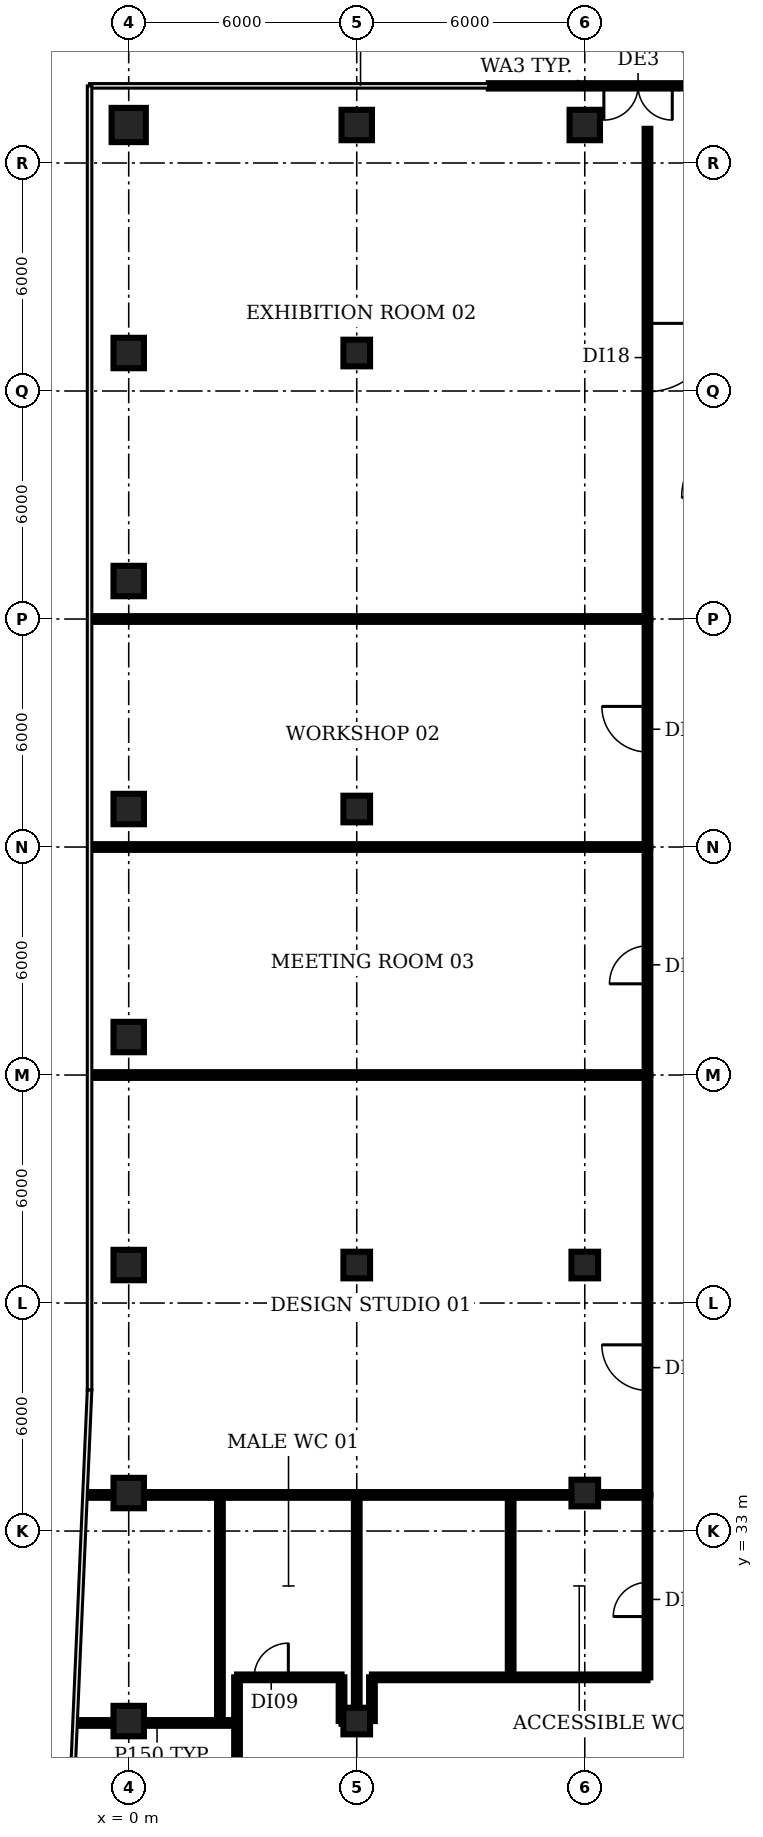
"""IFC4 building model, lengths in metres.
Left out: names, types, materials, properties, quantities, classifications, styles, units other than length and angle.
Written with IfcOpenShell. Run it as: python <this file> out.ifc"""

import sys

from ifc_helpers import new_model, si_unit, direction, frame, frame_2d, origin, origin_2d, place, context, subcontext, project, spatial, rectangle, circle, extrude, element, fill, save


model = new_model("IFC4")
c1 = context("Model", 3, precision=1e-05, world=origin(), true_north=direction((0.0, 1.0)))
c2 = subcontext(c1, "Body", "Model", "MODEL_VIEW")
j1 = project(units=[si_unit("LENGTHUNIT", "METRE"), si_unit("PLANEANGLEUNIT", "RADIAN")], contexts=[c1])
p1 = place(None, origin())
s1 = spatial("IfcSite", under=j1, at=p1, CompositionType="ELEMENT")
p2 = place(p1, origin())
s2 = spatial("IfcBuilding", under=s1, at=p2, CompositionType="ELEMENT")
p3 = place(p2, frame((0.0, 0.0, 239.0)))
s3 = spatial("IfcBuildingStorey", under=s2, at=p3, CompositionType="ELEMENT", Elevation=239.0)
for number, where, z_axis, x_axis in (
    (1, (0.0, 28.0, 0.0), (0.0, 0.0, 1.0), (1.0, 0.0, 0.0)),
    (2, (0.0, 34.0, 0.0), (0.0, 0.0, 1.0), (1.0, 0.0, 0.0)),
    (3, (0.0, 40.0, 0.0), (0.0, 0.0, 1.0), (1.0, 0.0, 0.0)),
    (4, (0.0, 46.0, 0.0), (0.0, 0.0, 1.0), (1.0, 0.0, 0.0)),
    (5, (0.0, 52.0, 0.0), (0.0, 0.0, 1.0), (1.0, 0.0, 0.0)),
    (6, (0.0, 58.0, 0.0), (0.0, 0.0, 1.0), (1.0, 0.0, 0.0)),
    (7, (0.0, 64.0, 0.0), (0.0, 0.0, 1.0), (1.0, 0.0, 0.0)),
):
    element("IfcColumn", number, at=place(p3, frame(where, z_axis=z_axis, x_axis=x_axis)), inside=s3, PredefinedType="COLUMN", context=c2, shape_type="SweptSolid", body=[
        extrude(rectangle(XDim=0.8, YDim=0.8, at=origin_2d()), origin(), (0.0, 0.0, 1.0), 3.85),
    ])
p4 = place(p3, frame((0.0, 70.0, 0.0), z_axis=(0.0, 0.0, 1.0), x_axis=(1.0, 0.0, 0.0)))
e8 = element("IfcColumn", 8, at=p4, inside=s3, PredefinedType="COLUMN", context=c2, shape_type="SweptSolid", body=[
    extrude(circle(Radius=0.45, at=origin_2d()), origin(), (0.0, 0.0, 1.0), 3.85),
])
for number, where, z_axis, x_axis in (
    (9, (6.0, 28.0, 0.0), (0.0, 0.0, 1.0), (1.0, 0.0, 0.0)),
    (10, (6.0, 40.0, 0.0), (0.0, 0.0, 1.0), (1.0, 0.0, 0.0)),
    (11, (6.0, 52.0, 0.0), (0.0, 0.0, 1.0), (1.0, 0.0, 0.0)),
    (12, (6.0, 64.0, 0.0), (0.0, 0.0, 1.0), (1.0, 0.0, 0.0)),
):
    element("IfcColumn", number, at=place(p3, frame(where, z_axis=z_axis, x_axis=x_axis)), inside=s3, PredefinedType="COLUMN", context=c2, shape_type="SweptSolid", body=[
        extrude(rectangle(XDim=0.7, YDim=0.7, at=origin_2d()), origin(), (0.0, 0.0, 1.0), 3.85),
    ])
p5 = place(p3, frame((6.0, 70.0, 0.0), z_axis=(0.0, 0.0, 1.0), x_axis=(1.0, 0.0, 0.0)))
e13 = element("IfcColumn", 13, at=p5, inside=s3, PredefinedType="COLUMN", context=c2, shape_type="SweptSolid", body=[
    extrude(rectangle(XDim=0.8, YDim=0.8, at=origin_2d()), origin(), (0.0, 0.0, 1.0), 3.85),
])
for number, where, z_axis, x_axis in (
    (14, (12.0, 34.0, 0.0), (0.0, 0.0, 1.0), (1.0, 0.0, 0.0)),
    (15, (12.0, 40.0, 0.0), (0.0, 0.0, 1.0), (1.0, 0.0, 0.0)),
):
    element("IfcColumn", number, at=place(p3, frame(where, z_axis=z_axis, x_axis=x_axis)), inside=s3, PredefinedType="COLUMN", context=c2, shape_type="SweptSolid", body=[
        extrude(rectangle(XDim=0.7, YDim=0.7, at=origin_2d()), origin(), (0.0, 0.0, 1.0), 3.85),
    ])
p6 = place(p3, frame((12.0, 70.0, 0.0), z_axis=(0.0, 0.0, 1.0), x_axis=(1.0, 0.0, 0.0)))
e16 = element("IfcColumn", 16, at=p6, inside=s3, PredefinedType="COLUMN", context=c2, shape_type="SweptSolid", body=[
    extrude(rectangle(XDim=0.8, YDim=0.8, at=origin_2d()), origin(), (0.0, 0.0, 1.0), 3.85),
])
p7 = place(p3, frame((14.729, 71.03, 0.0), z_axis=(0.0, 0.0, 1.0), x_axis=(-1.0, 0.0, 0.0)))
e17 = element("IfcWall", 17, at=p7, inside=s3, PredefinedType="SOLIDWALL", context=c2, shape_type="SweptSolid", body=[
    extrude(rectangle(XDim=5.253, YDim=0.14, at=frame_2d((2.626, 0.0))), origin(), (0.0, 0.0, 1.0), 3.85),
])
p8 = place(p7, frame((0.427, 0.0, 0.0)))
e18 = element("IfcOpeningElement", 18, at=p8, cuts=e17, PredefinedType="OPENING", context=c2, shape_type="SweptSolid", body=[
    extrude(rectangle(XDim=1.8, YDim=2.4, at=frame_2d((0.9, 1.2))), frame((0.0, 0.08, 0.0), z_axis=(0.0, -1.0, 0.0), x_axis=(1.0, 0.0, 0.0)), (0.0, 0.0, 1.0), 0.16),
])
p9 = place(p3, frame((-1.36, 27.95, 0.0), z_axis=(0.0, 0.0, 1.0), x_axis=(1.0, 0.0, 0.0)))
e19 = element("IfcWall", 19, at=p9, inside=s3, PredefinedType="PARTITIONING", context=c2, shape_type="SweptSolid", body=[
    extrude(rectangle(XDim=4.21, YDim=0.15, at=frame_2d((2.105, 0.0))), origin(), (0.0, 0.0, 1.0), 2.88),
])
p10 = place(p3, frame((-1.1, 33.95, 0.0), z_axis=(0.0, 0.0, 1.0), x_axis=(1.0, 0.0, 0.0)))
e20 = element("IfcWall", 20, at=p10, inside=s3, PredefinedType="PARTITIONING", context=c2, shape_type="SweptSolid", body=[
    extrude(rectangle(XDim=14.75, YDim=0.15, at=frame_2d((7.375, 0.0))), origin(), (0.0, 0.0, 1.0), 2.88),
])
for number, where, z_axis, x_axis in (
    (21, (-0.98, 45.0, 0.0), (0.0, 0.0, 1.0), (1.0, 0.0, 0.0)),
    (22, (-0.98, 51.0, 0.0), (0.0, 0.0, 1.0), (1.0, 0.0, 0.0)),
    (23, (-0.98, 57.0, 0.0), (0.0, 0.0, 1.0), (1.0, 0.0, 0.0)),
):
    element("IfcWall", number, at=place(p3, frame(where, z_axis=z_axis, x_axis=x_axis)), inside=s3, PredefinedType="PARTITIONING", context=c2, shape_type="SweptSolid", body=[
        extrude(rectangle(XDim=14.63, YDim=0.15, at=frame_2d((7.315, 0.0))), origin(), (0.0, 0.0, 1.0), 2.88),
    ])
p11 = place(p3, frame((2.4, 27.95, 0.0), z_axis=(0.0, 0.0, 1.0), x_axis=(0.0, 1.0, 0.0)))
e24 = element("IfcWall", 24, at=p11, inside=s3, PredefinedType="PARTITIONING", context=c2, shape_type="SweptSolid", body=[
    extrude(rectangle(XDim=6.0, YDim=0.15, at=frame_2d((3.0, 0.0))), origin(), (0.0, 0.0, 1.0), 2.88),
])
p12 = place(p3, frame((2.85, 25.25, 0.0), z_axis=(0.0, 0.0, 1.0), x_axis=(0.0, 1.0, 0.0)))
e25 = element("IfcWall", 25, at=p12, inside=s3, PredefinedType="PARTITIONING", context=c2, shape_type="SweptSolid", body=[
    extrude(rectangle(XDim=3.9, YDim=0.15, at=frame_2d((1.95, 0.0))), origin(), (0.0, 0.0, 1.0), 2.88),
])
p13 = place(p3, frame((2.85, 29.15, 0.0), z_axis=(0.0, 0.0, 1.0), x_axis=(1.0, 0.0, 0.0)))
e26 = element("IfcWall", 26, at=p13, inside=s3, PredefinedType="PARTITIONING", context=c2, shape_type="SweptSolid", body=[
    extrude(rectangle(XDim=2.75, YDim=0.15, at=frame_2d((1.375, 0.0))), origin(), (0.0, 0.0, 1.0), 2.88),
])
p14 = place(p13, frame((0.45, 0.0, 0.0)))
e27 = element("IfcOpeningElement", 27, at=p14, cuts=e26, PredefinedType="OPENING", context=c2, shape_type="SweptSolid", body=[
    extrude(rectangle(XDim=0.9, YDim=2.1, at=frame_2d((0.45, 1.05))), frame((0.0, 0.085, 0.0), z_axis=(0.0, -1.0, 0.0), x_axis=(1.0, 0.0, 0.0)), (0.0, 0.0, 1.0), 0.17),
])
p15 = place(p3, frame((5.6, 28.0, 0.0), z_axis=(0.0, 0.0, 1.0), x_axis=(0.0, 1.0, 0.0)))
e28 = element("IfcWall", 28, at=p15, inside=s3, PredefinedType="PARTITIONING", context=c2, shape_type="SweptSolid", body=[
    extrude(rectangle(XDim=1.15, YDim=0.15, at=frame_2d((0.575, 0.0))), origin(), (0.0, 0.0, 1.0), 2.88),
])
p16 = place(p3, frame((5.6, 28.0, 0.0), z_axis=(0.0, 0.0, 1.0), x_axis=(1.0, 0.0, 0.0)))
e29 = element("IfcWall", 29, at=p16, inside=s3, PredefinedType="PARTITIONING", context=c2, shape_type="SweptSolid", body=[
    extrude(rectangle(XDim=0.4, YDim=0.15, at=frame_2d((0.2, 0.0))), origin(), (0.0, 0.0, 1.0), 2.88),
])
p17 = place(p3, frame((6.0, 28.0, 0.0), z_axis=(0.0, 0.0, 1.0), x_axis=(0.0, 1.0, 0.0)))
e30 = element("IfcWall", 30, at=p17, inside=s3, PredefinedType="PARTITIONING", context=c2, shape_type="SweptSolid", body=[
    extrude(rectangle(XDim=5.95, YDim=0.15, at=frame_2d((2.975, 0.0))), origin(), (0.0, 0.0, 1.0), 2.88),
])
p18 = place(p3, frame((6.4, 28.0, 0.0), z_axis=(0.0, 0.0, 1.0), x_axis=(0.0, 1.0, 0.0)))
e31 = element("IfcWall", 31, at=p18, inside=s3, PredefinedType="PARTITIONING", context=c2, shape_type="SweptSolid", body=[
    extrude(rectangle(XDim=1.15, YDim=0.15, at=frame_2d((0.575, 0.0))), origin(), (0.0, 0.0, 1.0), 2.88),
])
p19 = place(p3, frame((6.4, 29.15, 0.0), z_axis=(0.0, 0.0, 1.0), x_axis=(1.0, 0.0, 0.0)))
e32 = element("IfcWall", 32, at=p19, inside=s3, PredefinedType="PARTITIONING", context=c2, shape_type="SweptSolid", body=[
    extrude(rectangle(XDim=7.25, YDim=0.15, at=frame_2d((3.625, 0.0))), origin(), (0.0, 0.0, 1.0), 2.88),
])
p20 = place(p3, frame((10.05, 29.15, 0.0), z_axis=(0.0, 0.0, 1.0), x_axis=(0.0, 1.0, 0.0)))
e33 = element("IfcWall", 33, at=p20, inside=s3, PredefinedType="PARTITIONING", context=c2, shape_type="SweptSolid", body=[
    extrude(rectangle(XDim=4.8, YDim=0.15, at=frame_2d((2.4, 0.0))), origin(), (0.0, 0.0, 1.0), 2.88),
])
p21 = place(p3, frame((13.65, 29.15, 0.0), z_axis=(0.0, 0.0, 1.0), x_axis=(0.0, 1.0, 0.0)))
e34 = element("IfcWall", 34, at=p21, inside=s3, PredefinedType="PARTITIONING", context=c2, shape_type="SweptSolid", body=[
    extrude(rectangle(XDim=4.8, YDim=0.15, at=frame_2d((2.4, 0.0))), origin(), (0.0, 0.0, 1.0), 2.88),
])
p22 = place(p21, frame((1.6, 0.0, 0.0)))
e35 = element("IfcOpeningElement", 35, at=p22, cuts=e34, PredefinedType="OPENING", context=c2, shape_type="SweptSolid", body=[
    extrude(rectangle(XDim=0.9, YDim=2.1, at=frame_2d((0.45, 1.05))), frame((0.0, 0.085, 0.0), z_axis=(0.0, -1.0, 0.0), x_axis=(1.0, 0.0, 0.0)), (0.0, 0.0, 1.0), 0.17),
])
p23 = place(p3, frame((13.65, 33.95, 0.0), z_axis=(0.0, 0.0, 1.0), x_axis=(0.0, 1.0, 0.0)))
e36 = element("IfcWall", 36, at=p23, inside=s3, PredefinedType="PARTITIONING", context=c2, shape_type="SweptSolid", body=[
    extrude(rectangle(XDim=11.05, YDim=0.15, at=frame_2d((5.525, 0.0))), origin(), (0.0, 0.0, 1.0), 2.88),
])
p24 = place(p23, frame((2.75, 0.0, 0.0)))
e37 = element("IfcOpeningElement", 37, at=p24, cuts=e36, PredefinedType="OPENING", context=c2, shape_type="SweptSolid", body=[
    extrude(rectangle(XDim=1.2, YDim=2.1, at=frame_2d((0.6, 1.05))), frame((0.0, 0.085, 0.0), z_axis=(0.0, -1.0, 0.0), x_axis=(1.0, 0.0, 0.0)), (0.0, 0.0, 1.0), 0.17),
])
p25 = place(p3, frame((13.65, 45.0, 0.0), z_axis=(0.0, 0.0, 1.0), x_axis=(0.0, 1.0, 0.0)))
e38 = element("IfcWall", 38, at=p25, inside=s3, PredefinedType="PARTITIONING", context=c2, shape_type="SweptSolid", body=[
    extrude(rectangle(XDim=6.0, YDim=0.15, at=frame_2d((3.0, 0.0))), origin(), (0.0, 0.0, 1.0), 2.88),
])
p26 = place(p25, frame((2.4, 0.0, 0.0)))
e39 = element("IfcOpeningElement", 39, at=p26, cuts=e38, PredefinedType="OPENING", context=c2, shape_type="SweptSolid", body=[
    extrude(rectangle(XDim=1.0, YDim=2.1, at=frame_2d((0.5, 1.05))), frame((0.0, 0.085, 0.0), z_axis=(0.0, -1.0, 0.0), x_axis=(1.0, 0.0, 0.0)), (0.0, 0.0, 1.0), 0.17),
])
p27 = place(p3, frame((13.65, 51.0, 0.0), z_axis=(0.0, 0.0, 1.0), x_axis=(0.0, 1.0, 0.0)))
e40 = element("IfcWall", 40, at=p27, inside=s3, PredefinedType="PARTITIONING", context=c2, shape_type="SweptSolid", body=[
    extrude(rectangle(XDim=6.0, YDim=0.15, at=frame_2d((3.0, 0.0))), origin(), (0.0, 0.0, 1.0), 2.88),
])
p28 = place(p27, frame((2.5, 0.0, 0.0)))
e41 = element("IfcOpeningElement", 41, at=p28, cuts=e40, PredefinedType="OPENING", context=c2, shape_type="SweptSolid", body=[
    extrude(rectangle(XDim=1.2, YDim=2.1, at=frame_2d((0.6, 1.05))), frame((0.0, 0.085, 0.0), z_axis=(0.0, -1.0, 0.0), x_axis=(1.0, 0.0, 0.0)), (0.0, 0.0, 1.0), 0.17),
])
p29 = place(p3, frame((13.65, 69.9, 0.0), z_axis=(0.0, 0.0, 1.0), x_axis=(0.0, -1.0, 0.0)))
e42 = element("IfcWall", 42, at=p29, inside=s3, PredefinedType="PARTITIONING", context=c2, shape_type="SweptSolid", body=[
    extrude(rectangle(XDim=12.9, YDim=0.15, at=frame_2d((6.45, 0.0))), origin(), (0.0, 0.0, 1.0), 2.88),
])
p30 = place(p29, frame((5.12, 0.0, 0.0)))
e43 = element("IfcOpeningElement", 43, at=p30, cuts=e42, PredefinedType="OPENING", context=c2, shape_type="SweptSolid", body=[
    extrude(rectangle(XDim=1.8, YDim=2.1, at=frame_2d((0.9, 1.05))), frame((0.0, 0.085, 0.0), z_axis=(0.0, -1.0, 0.0), x_axis=(1.0, 0.0, 0.0)), (0.0, 0.0, 1.0), 0.17),
])
p31 = place(p8, origin())
e44 = element("IfcDoor", 44, at=p31, inside=s3, OperationType="DOUBLE_DOOR_DOUBLE_SWING", PredefinedType="DOOR", context=c2, shape_type="SweptSolid", body=[
    extrude(rectangle(XDim=1.8, YDim=2.4, at=frame_2d((0.9, 1.2))), frame((0.0, 0.025, 0.0), z_axis=(0.0, -1.0, 0.0), x_axis=(1.0, 0.0, 0.0)), (0.0, 0.0, 1.0), 0.05),
])
fill(e18, e44)
p32 = place(p14, origin())
e45 = element("IfcDoor", 45, at=p32, inside=s3, OperationType="SINGLE_SWING_RIGHT", PredefinedType="DOOR", context=c2, shape_type="SweptSolid", body=[
    extrude(rectangle(XDim=0.9, YDim=2.1, at=frame_2d((0.45, 1.05))), frame((0.0, 0.025, 0.0), z_axis=(0.0, -1.0, 0.0), x_axis=(1.0, 0.0, 0.0)), (0.0, 0.0, 1.0), 0.05),
])
fill(e27, e45)
p33 = place(p22, origin())
e46 = element("IfcDoor", 46, at=p33, inside=s3, OperationType="SINGLE_SWING_LEFT", PredefinedType="DOOR", context=c2, shape_type="SweptSolid", body=[
    extrude(rectangle(XDim=0.9, YDim=2.1, at=frame_2d((0.45, 1.05))), frame((0.0, 0.025, 0.0), z_axis=(0.0, -1.0, 0.0), x_axis=(1.0, 0.0, 0.0)), (0.0, 0.0, 1.0), 0.05),
])
fill(e35, e46)
p34 = place(p24, origin())
e47 = element("IfcDoor", 47, at=p34, inside=s3, OperationType="SINGLE_SWING_RIGHT", PredefinedType="DOOR", context=c2, shape_type="SweptSolid", body=[
    extrude(rectangle(XDim=1.2, YDim=2.1, at=frame_2d((0.6, 1.05))), frame((0.0, 0.025, 0.0), z_axis=(0.0, -1.0, 0.0), x_axis=(1.0, 0.0, 0.0)), (0.0, 0.0, 1.0), 0.05),
])
fill(e37, e47)
p35 = place(p26, origin())
e48 = element("IfcDoor", 48, at=p35, inside=s3, OperationType="SINGLE_SWING_LEFT", PredefinedType="DOOR", context=c2, shape_type="SweptSolid", body=[
    extrude(rectangle(XDim=1.0, YDim=2.1, at=frame_2d((0.5, 1.05))), frame((0.0, 0.025, 0.0), z_axis=(0.0, -1.0, 0.0), x_axis=(1.0, 0.0, 0.0)), (0.0, 0.0, 1.0), 0.05),
])
fill(e39, e48)
p36 = place(p28, origin())
e49 = element("IfcDoor", 49, at=p36, inside=s3, OperationType="SINGLE_SWING_RIGHT", PredefinedType="DOOR", context=c2, shape_type="SweptSolid", body=[
    extrude(rectangle(XDim=1.2, YDim=2.1, at=frame_2d((0.6, 1.05))), frame((0.0, 0.025, 0.0), z_axis=(0.0, -1.0, 0.0), x_axis=(1.0, 0.0, 0.0)), (0.0, 0.0, 1.0), 0.05),
])
fill(e41, e49)
p37 = place(p30, origin())
e50 = element("IfcDoor", 50, at=p37, inside=s3, OperationType="SINGLE_SWING_LEFT", PredefinedType="DOOR", context=c2, shape_type="SweptSolid", body=[
    extrude(rectangle(XDim=1.8, YDim=2.1, at=frame_2d((0.9, 1.05))), frame((0.0, 0.025, 0.0), z_axis=(0.0, -1.0, 0.0), x_axis=(1.0, 0.0, 0.0)), (0.0, 0.0, 1.0), 0.05),
])
fill(e43, e50)
save(model, sys.argv[1])
